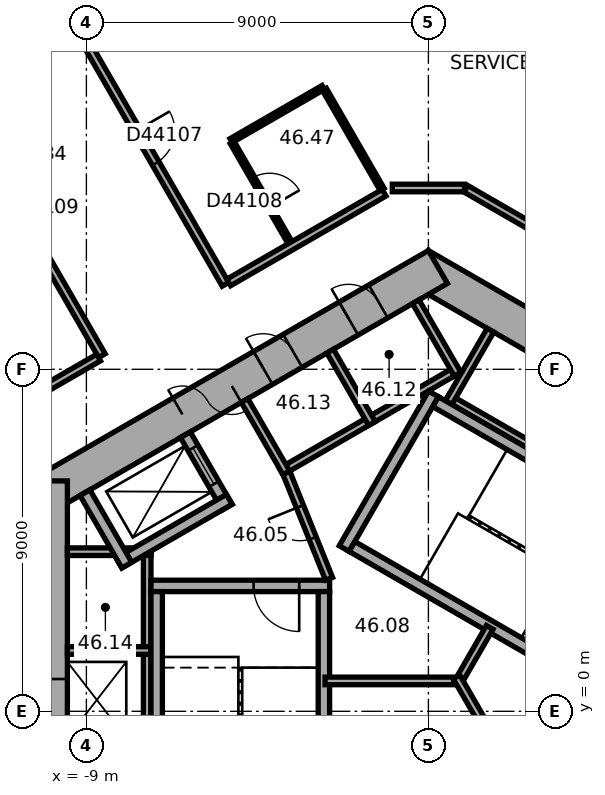
"""IFC4 building model, lengths in metres.
Left out: names, types, materials, properties, quantities, classifications, styles, units other than length and angle.
Written with IfcOpenShell. Run it as: python <this file> out.ifc"""

import sys

from ifc_helpers import new_model, si_unit, direction, frame, frame_2d, origin, place, context, subcontext, project, spatial, rectangle, extrude, element, fill, save


model = new_model("IFC4")
c1 = context("Model", 3, precision=1e-05, world=origin(), true_north=direction((0.0, 1.0)))
c2 = subcontext(c1, "Body", "Model", "MODEL_VIEW")
j1 = project(units=[si_unit("LENGTHUNIT", "METRE"), si_unit("PLANEANGLEUNIT", "RADIAN")], contexts=[c1])
p1 = place(None, origin())
s1 = spatial("IfcSite", under=j1, at=p1, CompositionType="ELEMENT")
p2 = place(p1, origin())
s2 = spatial("IfcBuilding", under=s1, at=p2, CompositionType="ELEMENT")
p3 = place(p2, frame((0.0, 0.0, 187.3)))
s3 = spatial("IfcBuildingStorey", under=s2, at=p3, CompositionType="ELEMENT", Elevation=187.3)
p4 = place(p3, frame((10.25, 5.629, 0.0), z_axis=(0.0, 0.0, 1.0), x_axis=(-0.866022616891, 0.50000482701, 0.0)))
e1 = element("IfcWall", 1, at=p4, inside=s3, PredefinedType="SHEAR", context=c2, shape_type="SweptSolid", body=[
    extrude(rectangle(XDim=12.125, YDim=1.0, at=frame_2d((6.062, 0.0))), origin(), (0.0, 0.0, 1.0), 3.7),
])
p5 = place(p4, frame((5.312, 0.0, 0.0)))
e2 = element("IfcOpeningElement", 2, at=p5, cuts=e1, PredefinedType="OPENING", context=c2, shape_type="SweptSolid", body=[
    extrude(rectangle(XDim=0.9, YDim=2.1, at=frame_2d((0.45, 1.05))), frame((0.0, 0.51, 0.0), z_axis=(0.0, -1.0, 0.0), x_axis=(1.0, 0.0, 0.0)), (0.0, 0.0, 1.0), 1.02),
])
p6 = place(p3, frame((0.25, 11.691, 0.0), z_axis=(0.0, 0.0, 1.0), x_axis=(-0.866022616891, -0.50000482701, 0.0)))
e3 = element("IfcWall", 3, at=p6, inside=s3, PredefinedType="SHEAR", context=c2, shape_type="SweptSolid", body=[
    extrude(rectangle(XDim=12.125, YDim=1.0, at=frame_2d((6.062, 0.0))), origin(), (0.0, 0.0, 1.0), 3.7),
])
p7 = place(p6, frame((6.262, 0.0, 0.0)))
e4 = element("IfcOpeningElement", 4, at=p7, cuts=e3, PredefinedType="OPENING", context=c2, shape_type="SweptSolid", body=[
    extrude(rectangle(XDim=1.5, YDim=2.1, at=frame_2d((0.75, 1.05))), frame((0.0, 0.51, 0.0), z_axis=(0.0, -1.0, 0.0), x_axis=(1.0, 0.0, 0.0)), (0.0, 0.0, 1.0), 1.02),
])
p8 = place(p6, frame((1.812, 0.0, 0.0)))
e5 = element("IfcOpeningElement", 5, at=p8, cuts=e3, PredefinedType="OPENING", context=c2, shape_type="SweptSolid", body=[
    extrude(rectangle(XDim=0.9, YDim=2.1, at=frame_2d((0.45, 1.05))), frame((0.0, 0.51, 0.0), z_axis=(0.0, -1.0, 0.0), x_axis=(1.0, 0.0, 0.0)), (0.0, 0.0, 1.0), 1.02),
])
p9 = place(p6, frame((4.412, 0.0, 0.0)))
e6 = element("IfcOpeningElement", 6, at=p9, cuts=e3, PredefinedType="OPENING", context=c2, shape_type="SweptSolid", body=[
    extrude(rectangle(XDim=0.9, YDim=2.1, at=frame_2d((0.45, 1.05))), frame((0.0, 0.51, 0.0), z_axis=(0.0, -1.0, 0.0), x_axis=(1.0, 0.0, 0.0)), (0.0, 0.0, 1.0), 1.02),
])
p10 = place(p3, frame((-10.0, 6.062, 0.0), z_axis=(0.0, 0.0, 1.0), x_axis=(0.0, -1.0, 0.0)))
e7 = element("IfcWall", 7, at=p10, inside=s3, PredefinedType="SHEAR", context=c2, shape_type="SweptSolid", body=[
    extrude(rectangle(XDim=12.125, YDim=1.0, at=frame_2d((6.062, 0.0))), origin(), (0.0, 0.0, 1.0), 3.7),
])
p11 = place(p10, frame((5.212, 0.0, 0.0)))
e8 = element("IfcOpeningElement", 8, at=p11, cuts=e7, PredefinedType="OPENING", context=c2, shape_type="SweptSolid", body=[
    extrude(rectangle(XDim=1.1, YDim=2.1, at=frame_2d((0.55, 1.05))), frame((0.0, 0.51, 0.0), z_axis=(0.0, -1.0, 0.0), x_axis=(1.0, 0.0, 0.0)), (0.0, 0.0, 1.0), 1.02),
])
p12 = place(p10, frame((7.812, 0.0, 0.0)))
e9 = element("IfcOpeningElement", 9, at=p12, cuts=e7, PredefinedType="OPENING", context=c2, shape_type="SweptSolid", body=[
    extrude(rectangle(XDim=1.1, YDim=2.1, at=frame_2d((0.55, 1.05))), frame((0.0, 0.51, 0.0), z_axis=(0.0, -1.0, 0.0), x_axis=(1.0, 0.0, 0.0)), (0.0, 0.0, 1.0), 1.02),
])
p13 = place(p3, frame((19.464, 14.599, 0.0), z_axis=(0.0, 0.0, 1.0), x_axis=(-0.894935755043, 0.446195018289, 0.0)))
e10 = element("IfcWall", 10, at=p13, inside=s3, PredefinedType="STANDARD", context=c2, shape_type="SweptSolid", body=[
    extrude(rectangle(XDim=20.044, YDim=0.2, at=frame_2d((10.022, 0.0))), origin(), (0.0, 0.0, 1.0), 3.7),
])
p14 = place(p13, frame((1.313, 0.0, 0.9)))
e11 = element("IfcOpeningElement", 11, at=p14, cuts=e10, PredefinedType="OPENING", context=c2, shape_type="SweptSolid", body=[
    extrude(rectangle(XDim=2.4, YDim=2.0, at=frame_2d((1.2, 1.0))), frame((0.0, 0.11, 0.0), z_axis=(0.0, -1.0, 0.0), x_axis=(1.0, 0.0, 0.0)), (0.0, 0.0, 1.0), 0.22),
])
p15 = place(p13, frame((5.067, 0.0, 0.9)))
e12 = element("IfcOpeningElement", 12, at=p15, cuts=e10, PredefinedType="OPENING", context=c2, shape_type="SweptSolid", body=[
    extrude(rectangle(XDim=2.4, YDim=2.0, at=frame_2d((1.2, 1.0))), frame((0.0, 0.11, 0.0), z_axis=(0.0, -1.0, 0.0), x_axis=(1.0, 0.0, 0.0)), (0.0, 0.0, 1.0), 0.22),
])
p16 = place(p13, frame((8.821, 0.0, 0.9)))
e13 = element("IfcOpeningElement", 13, at=p16, cuts=e10, PredefinedType="OPENING", context=c2, shape_type="SweptSolid", body=[
    extrude(rectangle(XDim=2.4, YDim=2.0, at=frame_2d((1.2, 1.0))), frame((0.0, 0.11, 0.0), z_axis=(0.0, -1.0, 0.0), x_axis=(1.0, 0.0, 0.0)), (0.0, 0.0, 1.0), 0.22),
])
p17 = place(p13, frame((12.575, 0.0, 0.9)))
e14 = element("IfcOpeningElement", 14, at=p17, cuts=e10, PredefinedType="OPENING", context=c2, shape_type="SweptSolid", body=[
    extrude(rectangle(XDim=2.4, YDim=2.0, at=frame_2d((1.2, 1.0))), frame((0.0, 0.11, 0.0), z_axis=(0.0, -1.0, 0.0), x_axis=(1.0, 0.0, 0.0)), (0.0, 0.0, 1.0), 0.22),
])
p18 = place(p13, frame((16.329, 0.0, 0.9)))
e15 = element("IfcOpeningElement", 15, at=p18, cuts=e10, PredefinedType="OPENING", context=c2, shape_type="SweptSolid", body=[
    extrude(rectangle(XDim=2.4, YDim=2.0, at=frame_2d((1.2, 1.0))), frame((0.0, 0.11, 0.0), z_axis=(0.0, -1.0, 0.0), x_axis=(1.0, 0.0, 0.0)), (0.0, 0.0, 1.0), 0.22),
])
p19 = place(p3, frame((-2.961, 23.405, 0.0), z_axis=(0.0, 0.0, 1.0), x_axis=(-0.866023315909, -0.500003616288, 0.0)))
e16 = element("IfcWall", 16, at=p19, inside=s3, PredefinedType="STANDARD", context=c2, shape_type="SweptSolid", body=[
    extrude(rectangle(XDim=20.044, YDim=0.2, at=frame_2d((10.022, 0.0))), origin(), (0.0, 0.0, 1.0), 3.7),
])
p20 = place(p19, frame((1.314, 0.0, 0.9)))
e17 = element("IfcOpeningElement", 17, at=p20, cuts=e16, PredefinedType="OPENING", context=c2, shape_type="SweptSolid", body=[
    extrude(rectangle(XDim=2.4, YDim=2.0, at=frame_2d((1.2, 1.0))), frame((0.0, 0.11, 0.0), z_axis=(0.0, -1.0, 0.0), x_axis=(1.0, 0.0, 0.0)), (0.0, 0.0, 1.0), 0.22),
])
p21 = place(p19, frame((5.069, 0.0, 0.9)))
e18 = element("IfcOpeningElement", 18, at=p21, cuts=e16, PredefinedType="OPENING", context=c2, shape_type="SweptSolid", body=[
    extrude(rectangle(XDim=2.4, YDim=2.0, at=frame_2d((1.2, 1.0))), frame((0.0, 0.11, 0.0), z_axis=(0.0, -1.0, 0.0), x_axis=(1.0, 0.0, 0.0)), (0.0, 0.0, 1.0), 0.22),
])
p22 = place(p19, frame((8.823, 0.0, 0.9)))
e19 = element("IfcOpeningElement", 19, at=p22, cuts=e16, PredefinedType="OPENING", context=c2, shape_type="SweptSolid", body=[
    extrude(rectangle(XDim=2.4, YDim=2.0, at=frame_2d((1.2, 1.0))), frame((0.0, 0.11, 0.0), z_axis=(0.0, -1.0, 0.0), x_axis=(1.0, 0.0, 0.0)), (0.0, 0.0, 1.0), 0.22),
])
p23 = place(p19, frame((12.577, 0.0, 0.9)))
e20 = element("IfcOpeningElement", 20, at=p23, cuts=e16, PredefinedType="OPENING", context=c2, shape_type="SweptSolid", body=[
    extrude(rectangle(XDim=2.4, YDim=2.0, at=frame_2d((1.2, 1.0))), frame((0.0, 0.11, 0.0), z_axis=(0.0, -1.0, 0.0), x_axis=(1.0, 0.0, 0.0)), (0.0, 0.0, 1.0), 0.22),
])
p24 = place(p19, frame((16.331, 0.0, 0.9)))
e21 = element("IfcOpeningElement", 21, at=p24, cuts=e16, PredefinedType="OPENING", context=c2, shape_type="SweptSolid", body=[
    extrude(rectangle(XDim=2.4, YDim=2.0, at=frame_2d((1.2, 1.0))), frame((0.0, 0.11, 0.0), z_axis=(0.0, -1.0, 0.0), x_axis=(1.0, 0.0, 0.0)), (0.0, 0.0, 1.0), 0.22),
])
p25 = place(p3, frame((7.424, 4.259, 0.0), z_axis=(0.0, 0.0, 1.0), x_axis=(-0.866026010844, 0.49999894854, 0.0)))
e22 = element("IfcWall", 22, at=p25, inside=s3, PredefinedType="PARTITIONING", context=c2, shape_type="SweptSolid", body=[
    extrude(rectangle(XDim=8.0, YDim=0.2, at=frame_2d((4.0, 0.0))), origin(), (0.0, 0.0, 1.0), 3.42),
])
p26 = place(p3, frame((0.532, 8.122, 0.0), z_axis=(0.0, 0.0, 1.0), x_axis=(0.500077893725, 0.86598042715, 0.0)))
e23 = element("IfcWall", 23, at=p26, inside=s3, PredefinedType="PARTITIONING", context=c2, shape_type="SweptSolid", body=[
    extrude(rectangle(XDim=2.2, YDim=0.2, at=frame_2d((1.1, 0.0))), origin(), (0.0, 0.0, 1.0), 3.42),
])
p27 = place(p3, frame((0.803, 9.009, 0.0), z_axis=(0.0, 0.0, 1.0), x_axis=(-0.866028230842, -0.499995103361, 0.0)))
e24 = element("IfcWall", 24, at=p27, inside=s3, PredefinedType="PARTITIONING", context=c2, shape_type="SweptSolid", body=[
    extrude(rectangle(XDim=5.4, YDim=0.2, at=frame_2d((2.7, 0.0))), origin(), (0.0, 0.0, 1.0), 3.42),
])
p28 = place(p3, frame((0.767, 8.872, 0.0), z_axis=(0.0, 0.0, 1.0), x_axis=(-0.499994660107, 0.866028486751, 0.0)))
e25 = element("IfcWall", 25, at=p28, inside=s3, PredefinedType="PARTITIONING", context=c2, shape_type="SweptSolid", body=[
    extrude(rectangle(XDim=2.2, YDim=0.2, at=frame_2d((1.1, 0.0))), origin(), (0.0, 0.0, 1.0), 3.42),
])
for number, where, z_axis, x_axis in (
    (26, (-1.485, 7.572, 0.0), (0.0, 0.0, 1.0), (-0.5, 0.866, 0.0)),
    (27, (-3.737, 6.272, 0.0), (0.0, 0.0, 1.0), (-0.5, 0.866, 0.0)),
):
    element("IfcWall", number, at=place(p3, frame(where, z_axis=z_axis, x_axis=x_axis)), inside=s3, PredefinedType="PARTITIONING", context=c2, shape_type="SweptSolid", body=[
        extrude(rectangle(XDim=2.2, YDim=0.2, at=frame_2d((1.1, 0.0))), origin(), (0.0, 0.0, 1.0), 3.42),
    ])
p29 = place(p3, frame((-7.4, 4.3, 0.0), z_axis=(0.0, 0.0, 1.0), x_axis=(0.0, -1.0, 0.0)))
e28 = element("IfcWall", 28, at=p29, inside=s3, PredefinedType="PARTITIONING", context=c2, shape_type="SweptSolid", body=[
    extrude(rectangle(XDim=8.0, YDim=0.2, at=frame_2d((4.0, 0.0))), origin(), (0.0, 0.0, 1.0), 3.42),
])
for number, where, z_axis, x_axis in (
    (29, (-7.3, 4.2, 0.0), (0.0, 0.0, 1.0), (-1.0, 0.0, 0.0)),
    (30, (-7.3, 1.6, 0.0), (0.0, 0.0, 1.0), (-1.0, 0.0, 0.0)),
):
    element("IfcWall", number, at=place(p3, frame(where, z_axis=z_axis, x_axis=x_axis)), inside=s3, PredefinedType="PARTITIONING", context=c2, shape_type="SweptSolid", body=[
        extrude(rectangle(XDim=2.2, YDim=0.2, at=frame_2d((1.1, 0.0))), origin(), (0.0, 0.0, 1.0), 3.42),
    ])
p30 = place(p3, frame((-2.216, 4.282, 0.0), z_axis=(0.0, 0.0, 1.0), x_axis=(0.499977259774, 0.866038532462, 0.0)))
e31 = element("IfcWall", 31, at=p30, inside=s3, PredefinedType="SHEAR", context=c2, shape_type="SweptSolid", body=[
    extrude(rectangle(XDim=4.7, YDim=0.3, at=frame_2d((2.35, 0.0))), origin(), (0.0, 0.0, 1.0), 3.42),
])
for number, where, z_axis, x_axis in (
    (32, (4.103, 0.807, 0.0), (0.0, 0.0, 1.0), (-0.866, 0.5, 0.0)),
    (33, (6.303, 4.617, 0.0), (0.0, 0.0, 1.0), (-0.866, 0.5, 0.0)),
):
    element("IfcWall", number, at=place(p3, frame(where, z_axis=z_axis, x_axis=x_axis)), inside=s3, PredefinedType="SHEAR", context=c2, shape_type="SweptSolid", body=[
        extrude(rectangle(XDim=7.06, YDim=0.3, at=frame_2d((3.53, 0.0))), origin(), (0.0, 0.0, 1.0), 3.42),
    ])
p31 = place(p3, frame((-2.6, 3.3, 0.0), z_axis=(0.0, 0.0, 1.0), x_axis=(-1.0, 0.0, 0.0)))
e34 = element("IfcWall", 34, at=p31, inside=s3, PredefinedType="SHEAR", context=c2, shape_type="SweptSolid", body=[
    extrude(rectangle(XDim=4.7, YDim=0.3, at=frame_2d((2.35, 0.0))), origin(), (0.0, 0.0, 1.0), 3.42),
])
p32 = place(p31, frame((0.8, 0.0, 0.0)))
e35 = element("IfcOpeningElement", 35, at=p32, cuts=e34, PredefinedType="OPENING", context=c2, shape_type="SweptSolid", body=[
    extrude(rectangle(XDim=1.2, YDim=2.1, at=frame_2d((0.6, 1.05))), frame((0.0, 0.16, 0.0), z_axis=(0.0, -1.0, 0.0), x_axis=(1.0, 0.0, 0.0)), (0.0, 0.0, 1.0), 0.32),
])
for number, where, z_axis, x_axis in (
    (36, (-2.75, 3.15, 0.0), (0.0, 0.0, 1.0), (0.0, -1.0, 0.0)),
    (37, (-7.15, 3.15, 0.0), (0.0, 0.0, 1.0), (0.0, -1.0, 0.0)),
):
    element("IfcWall", number, at=place(p3, frame(where, z_axis=z_axis, x_axis=x_axis)), inside=s3, PredefinedType="SHEAR", context=c2, shape_type="SweptSolid", body=[
        extrude(rectangle(XDim=7.06, YDim=0.3, at=frame_2d((3.53, 0.0))), origin(), (0.0, 0.0, 1.0), 3.42),
    ])
p33 = place(p3, frame((-5.295, 5.372, 0.0), z_axis=(0.0, 0.0, 1.0), x_axis=(-0.500077893725, 0.86598042715, 0.0)))
e38 = element("IfcWall", 38, at=p33, inside=s3, PredefinedType="SHEAR", context=c2, shape_type="SweptSolid", body=[
    extrude(rectangle(XDim=2.2, YDim=0.3, at=frame_2d((1.1, 0.0))), origin(), (0.0, 0.0, 1.0), 3.42),
])
p34 = place(p33, frame((0.7, 0.0, 0.0)))
e39 = element("IfcOpeningElement", 39, at=p34, cuts=e38, PredefinedType="OPENING", context=c2, shape_type="SweptSolid", body=[
    extrude(rectangle(XDim=1.1, YDim=2.1, at=frame_2d((0.55, 1.05))), frame((0.0, 0.16, 0.0), z_axis=(0.0, -1.0, 0.0), x_axis=(1.0, 0.0, 0.0)), (0.0, 0.0, 1.0), 0.32),
])
p35 = place(p3, frame((-5.24, 5.577, 0.0), z_axis=(0.0, 0.0, 1.0), x_axis=(-0.866014461049, -0.500018952895, 0.0)))
e40 = element("IfcWall", 40, at=p35, inside=s3, PredefinedType="SHEAR", context=c2, shape_type="SweptSolid", body=[
    extrude(rectangle(XDim=3.35, YDim=0.3, at=frame_2d((1.675, 0.0))), origin(), (0.0, 0.0, 1.0), 3.42),
])
p36 = place(p3, frame((-7.937, 3.847, 0.0), z_axis=(0.0, 0.0, 1.0), x_axis=(-0.50002983664, 0.866008176907, 0.0)))
e41 = element("IfcWall", 41, at=p36, inside=s3, PredefinedType="SHEAR", context=c2, shape_type="SweptSolid", body=[
    extrude(rectangle(XDim=2.2, YDim=0.3, at=frame_2d((1.1, 0.0))), origin(), (0.0, 0.0, 1.0), 3.42),
])
p37 = place(p3, frame((-2.615, 3.487, 0.0), z_axis=(0.0, 0.0, 1.0), x_axis=(-0.373576831041, 0.92759924068, 0.0)))
e42 = element("IfcWall", 42, at=p37, inside=s3, PredefinedType="PARTITIONING", context=c2, shape_type="SweptSolid", body=[
    extrude(rectangle(XDim=3.002, YDim=0.2, at=frame_2d((1.501, 0.0))), origin(), (0.0, 0.0, 1.0), 3.42),
])
p38 = place(p37, frame((1.15, 0.0, 0.0)))
e43 = element("IfcOpeningElement", 43, at=p38, cuts=e42, PredefinedType="OPENING", context=c2, shape_type="SweptSolid", body=[
    extrude(rectangle(XDim=0.9, YDim=2.1, at=frame_2d((0.45, 1.05))), frame((0.0, 0.11, 0.0), z_axis=(0.0, -1.0, 0.0), x_axis=(1.0, 0.0, 0.0)), (0.0, 0.0, 1.0), 0.22),
])
p39 = place(p3, frame((0.92, 0.8, 0.0), z_axis=(0.0, 0.0, 1.0), x_axis=(-1.0, 0.0, 0.0)))
e44 = element("IfcWall", 44, at=p39, inside=s3, PredefinedType="PARTITIONING", context=c2, shape_type="SweptSolid", body=[
    extrude(rectangle(XDim=3.64, YDim=0.2, at=frame_2d((1.82, 0.0))), origin(), (0.0, 0.0, 1.0), 3.42),
])
p40 = place(p3, frame((0.74, 0.696, 0.0), z_axis=(0.0, 0.0, 1.0), x_axis=(0.499956301907, 0.86605063142, 0.0)))
e45 = element("IfcWall", 45, at=p40, inside=s3, PredefinedType="PARTITIONING", context=c2, shape_type="SweptSolid", body=[
    extrude(rectangle(XDim=1.747, YDim=0.2, at=frame_2d((0.874, 0.0))), origin(), (0.0, 0.0, 1.0), 3.42),
])
p41 = place(p3, frame((0.74, 0.904, 0.0), z_axis=(0.0, 0.0, 1.0), x_axis=(0.500028278809, -0.866009076391, 0.0)))
e46 = element("IfcWall", 46, at=p41, inside=s3, PredefinedType="PARTITIONING", context=c2, shape_type="SweptSolid", body=[
    extrude(rectangle(XDim=3.133, YDim=0.2, at=frame_2d((1.566, 0.0))), origin(), (0.0, 0.0, 1.0), 3.42),
])
p42 = place(p3, frame((-12.766, 16.589, 0.0), z_axis=(0.0, 0.0, 1.0), x_axis=(0.500010139422, -0.866019549707, 0.0)))
e47 = element("IfcWall", 47, at=p42, inside=s3, PredefinedType="PARTITIONING", context=c2, shape_type="SweptSolid", body=[
    extrude(rectangle(XDim=8.35, YDim=0.2, at=frame_2d((4.175, 0.0))), origin(), (0.0, 0.0, 1.0), 3.42),
])
p43 = place(p42, frame((3.675, 0.0, 0.0)))
e48 = element("IfcOpeningElement", 48, at=p43, cuts=e47, PredefinedType="OPENING", context=c2, shape_type="SweptSolid", body=[
    extrude(rectangle(XDim=1.0, YDim=2.1, at=frame_2d((0.5, 1.05))), frame((0.0, 0.11, 0.0), z_axis=(0.0, -1.0, 0.0), x_axis=(1.0, 0.0, 0.0)), (0.0, 0.0, 1.0), 0.22),
])
p44 = place(p3, frame((-9.515, 18.466, 0.0), z_axis=(0.0, 0.0, 1.0), x_axis=(0.500010139422, -0.866019549707, 0.0)))
e49 = element("IfcWall", 49, at=p44, inside=s3, PredefinedType="PARTITIONING", context=c2, shape_type="SweptSolid", body=[
    extrude(rectangle(XDim=8.35, YDim=0.2, at=frame_2d((4.175, 0.0))), origin(), (0.0, 0.0, 1.0), 2.87),
])
p45 = place(p44, frame((3.675, 0.0, 0.0)))
e50 = element("IfcOpeningElement", 50, at=p45, cuts=e49, PredefinedType="OPENING", context=c2, shape_type="SweptSolid", body=[
    extrude(rectangle(XDim=1.0, YDim=2.1, at=frame_2d((0.5, 1.05))), frame((0.0, 0.11, 0.0), z_axis=(0.0, -1.0, 0.0), x_axis=(1.0, 0.0, 0.0)), (0.0, 0.0, 1.0), 0.22),
])
p46 = place(p3, frame((-8.678, 9.308, 0.0), z_axis=(0.0, 0.0, 1.0), x_axis=(-0.866000359435, -0.500043375578, 0.0)))
e51 = element("IfcWall", 51, at=p46, inside=s3, PredefinedType="PARTITIONING", context=c2, shape_type="SweptSolid", body=[
    extrude(rectangle(XDim=3.161, YDim=0.2, at=frame_2d((1.581, 0.0))), origin(), (0.0, 0.0, 1.0), 3.42),
])
p47 = place(p3, frame((-5.191, 15.016, 0.0), z_axis=(0.0, 0.0, 1.0), x_axis=(0.866034573852, 0.49998411664, 0.0)))
e52 = element("IfcWall", 52, at=p47, inside=s3, PredefinedType="PARTITIONING", context=c2, shape_type="SweptSolid", body=[
    extrude(rectangle(XDim=2.8, YDim=0.12, at=frame_2d((1.4, 0.0))), origin(), (0.0, 0.0, 1.0), 3.42),
])
p48 = place(p3, frame((-3.641, 12.331, 0.0), z_axis=(0.0, 0.0, 1.0), x_axis=(-0.499991248344, 0.866030456496, 0.0)))
e53 = element("IfcWall", 53, at=p48, inside=s3, PredefinedType="PARTITIONING", context=c2, shape_type="SweptSolid", body=[
    extrude(rectangle(XDim=3.04, YDim=0.12, at=frame_2d((1.52, 0.0))), origin(), (0.0, 0.0, 1.0), 3.42),
])
p49 = place(p48, frame((1.07, 0.0, 0.0)))
e54 = element("IfcOpeningElement", 54, at=p49, cuts=e53, PredefinedType="OPENING", context=c2, shape_type="SweptSolid", body=[
    extrude(rectangle(XDim=0.9, YDim=2.1, at=frame_2d((0.45, 1.05))), frame((0.0, 0.07, 0.0), z_axis=(0.0, -1.0, 0.0), x_axis=(1.0, 0.0, 0.0)), (0.0, 0.0, 1.0), 0.14),
])
p50 = place(p3, frame((-2.737, 16.364, 0.0), z_axis=(0.0, 0.0, 1.0), x_axis=(0.500026023896, -0.86601037836, 0.0)))
e55 = element("IfcWall", 55, at=p50, inside=s3, PredefinedType="PARTITIONING", context=c2, shape_type="SweptSolid", body=[
    extrude(rectangle(XDim=3.04, YDim=0.12, at=frame_2d((1.52, 0.0))), origin(), (0.0, 0.0, 1.0), 3.42),
])
p51 = place(p3, frame((-1.167, 13.645, 0.0), z_axis=(0.0, 0.0, 1.0), x_axis=(-0.866034830959, -0.499983671299, 0.0)))
e56 = element("IfcWall", 56, at=p51, inside=s3, PredefinedType="PARTITIONING", context=c2, shape_type="SweptSolid", body=[
    extrude(rectangle(XDim=4.719, YDim=0.2, at=frame_2d((2.36, 0.0))), origin(), (0.0, 0.0, 1.0), 3.42),
])
p52 = place(p3, frame((0.95, 13.77, 0.0), z_axis=(0.0, 0.0, 1.0), x_axis=(-1.0, 0.0, 0.0)))
e57 = element("IfcWall", 57, at=p52, inside=s3, PredefinedType="PARTITIONING", context=c2, shape_type="SweptSolid", body=[
    extrude(rectangle(XDim=1.9, YDim=0.2, at=frame_2d((0.95, 0.0))), origin(), (0.0, 0.0, 1.0), 3.42),
])
p53 = place(p3, frame((11.196, 7.854, 0.0), z_axis=(0.0, 0.0, 1.0), x_axis=(-0.866023877043, 0.500002644385, 0.0)))
e58 = element("IfcWall", 58, at=p53, inside=s3, PredefinedType="PARTITIONING", context=c2, shape_type="SweptSolid", body=[
    extrude(rectangle(XDim=11.792, YDim=0.2, at=frame_2d((5.896, 0.0))), origin(), (0.0, 0.0, 1.0), 3.42),
])
p54 = place(p53, frame((3.261, 0.0, 0.0)))
e59 = element("IfcOpeningElement", 59, at=p54, cuts=e58, PredefinedType="OPENING", context=c2, shape_type="SweptSolid", body=[
    extrude(rectangle(XDim=1.0, YDim=2.1, at=frame_2d((0.5, 1.05))), frame((0.0, 0.11, 0.0), z_axis=(0.0, -1.0, 0.0), x_axis=(1.0, 0.0, 0.0)), (0.0, 0.0, 1.0), 0.22),
])
p55 = place(p7, origin())
e60 = element("IfcDoor", 60, at=p55, inside=s3, OperationType="DOUBLE_DOOR_SINGLE_SWING", PredefinedType="DOOR", context=c2, shape_type="SweptSolid", body=[
    extrude(rectangle(XDim=1.5, YDim=2.1, at=frame_2d((0.75, 1.05))), frame((0.0, 0.025, 0.0), z_axis=(0.0, -1.0, 0.0), x_axis=(1.0, 0.0, 0.0)), (0.0, 0.0, 1.0), 0.05),
])
fill(e4, e60)
p56 = place(p32, origin())
e61 = element("IfcDoor", 61, at=p56, inside=s3, OperationType="SINGLE_SWING_RIGHT", PredefinedType="DOOR", context=c2, shape_type="SweptSolid", body=[
    extrude(rectangle(XDim=1.2, YDim=2.1, at=frame_2d((0.6, 1.05))), frame((0.0, 0.025, 0.0), z_axis=(0.0, -1.0, 0.0), x_axis=(1.0, 0.0, 0.0)), (0.0, 0.0, 1.0), 0.05),
])
fill(e35, e61)
p57 = place(p38, origin())
e62 = element("IfcDoor", 62, at=p57, inside=s3, OperationType="SINGLE_SWING_LEFT", PredefinedType="DOOR", context=c2, shape_type="SweptSolid", body=[
    extrude(rectangle(XDim=0.9, YDim=2.1, at=frame_2d((0.45, 1.05))), frame((0.0, 0.025, 0.0), z_axis=(0.0, -1.0, 0.0), x_axis=(1.0, 0.0, 0.0)), (0.0, 0.0, 1.0), 0.05),
])
fill(e43, e62)
p58 = place(p8, origin())
e63 = element("IfcDoor", 63, at=p58, inside=s3, OperationType="SINGLE_SWING_LEFT", PredefinedType="DOOR", context=c2, shape_type="SweptSolid", body=[
    extrude(rectangle(XDim=0.9, YDim=2.1, at=frame_2d((0.45, 1.05))), frame((0.0, 0.025, 0.0), z_axis=(0.0, -1.0, 0.0), x_axis=(1.0, 0.0, 0.0)), (0.0, 0.0, 1.0), 0.05),
])
fill(e5, e63)
p59 = place(p9, origin())
e64 = element("IfcDoor", 64, at=p59, inside=s3, OperationType="SINGLE_SWING_LEFT", PredefinedType="DOOR", context=c2, shape_type="SweptSolid", body=[
    extrude(rectangle(XDim=0.9, YDim=2.1, at=frame_2d((0.45, 1.05))), frame((0.0, 0.025, 0.0), z_axis=(0.0, -1.0, 0.0), x_axis=(1.0, 0.0, 0.0)), (0.0, 0.0, 1.0), 0.05),
])
fill(e6, e64)
p60 = place(p34, origin())
e65 = element("IfcDoor", 65, at=p60, inside=s3, OperationType="DOUBLE_DOOR_SLIDING", PredefinedType="DOOR", context=c2, shape_type="SweptSolid", body=[
    extrude(rectangle(XDim=1.1, YDim=2.1, at=frame_2d((0.55, 1.05))), frame((0.0, 0.025, 0.0), z_axis=(0.0, -1.0, 0.0), x_axis=(1.0, 0.0, 0.0)), (0.0, 0.0, 1.0), 0.05),
])
fill(e39, e65)
p61 = place(p45, origin())
e66 = element("IfcDoor", 66, at=p61, inside=s3, OperationType="SINGLE_SWING_LEFT", PredefinedType="DOOR", context=c2, shape_type="SweptSolid", body=[
    extrude(rectangle(XDim=1.0, YDim=2.1, at=frame_2d((0.5, 1.05))), frame((0.0, 0.025, 0.0), z_axis=(0.0, -1.0, 0.0), x_axis=(1.0, 0.0, 0.0)), (0.0, 0.0, 1.0), 0.05),
])
fill(e50, e66)
p62 = place(p49, origin())
e67 = element("IfcDoor", 67, at=p62, inside=s3, OperationType="SINGLE_SWING_LEFT", PredefinedType="DOOR", context=c2, shape_type="SweptSolid", body=[
    extrude(rectangle(XDim=0.9, YDim=2.1, at=frame_2d((0.45, 1.05))), frame((0.0, 0.025, 0.0), z_axis=(0.0, -1.0, 0.0), x_axis=(1.0, 0.0, 0.0)), (0.0, 0.0, 1.0), 0.05),
])
fill(e54, e67)
save(model, sys.argv[1])
